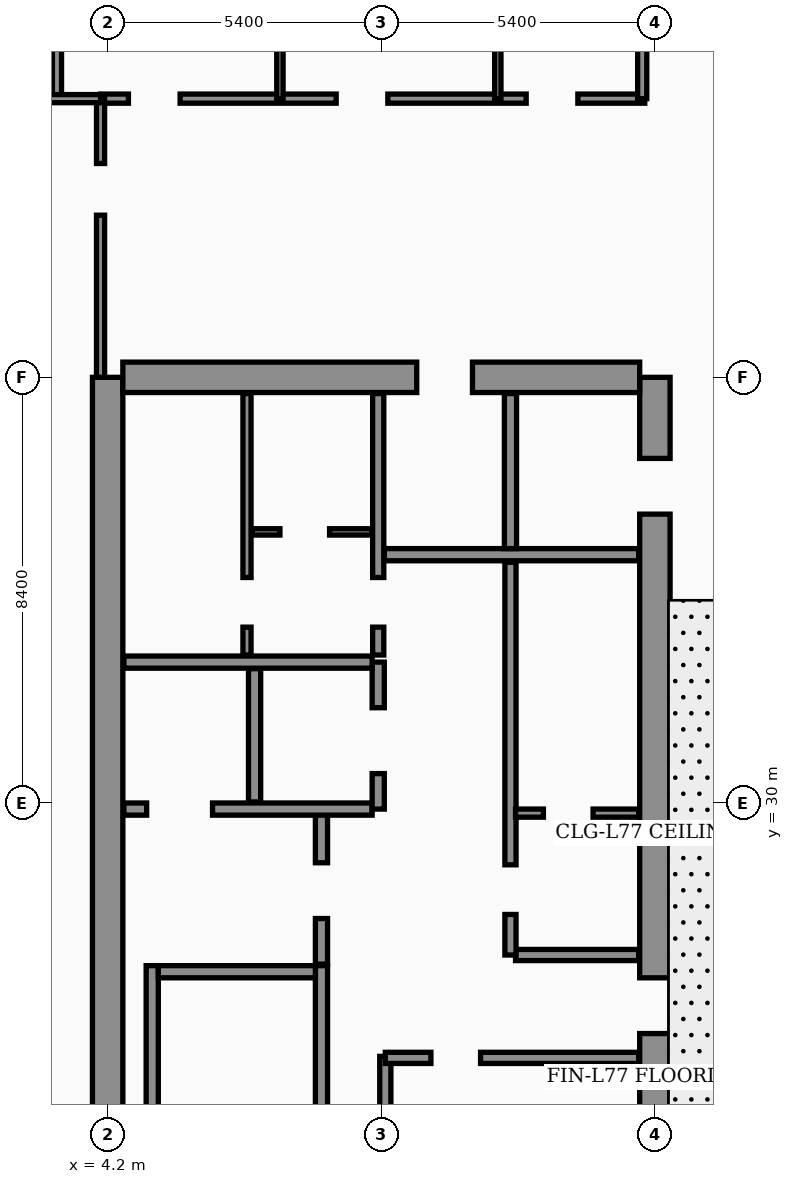
"""IFC4 building model, lengths in metres.
Left out: names, types, materials, properties, quantities, classifications, styles, units other than length and angle.
Written with IfcOpenShell. Run it as: python <this file> out.ifc"""

import sys

from ifc_helpers import new_model, si_unit, direction, frame, frame_2d, origin, place, context, subcontext, project, spatial, rectangle, extrude, element, fill, save


model = new_model("IFC4")
c1 = context("Model", 3, precision=1e-05, world=origin(), true_north=direction((0.0, 1.0)))
c2 = subcontext(c1, "Body", "Model", "MODEL_VIEW")
j1 = project(units=[si_unit("LENGTHUNIT", "METRE"), si_unit("PLANEANGLEUNIT", "RADIAN")], contexts=[c1])
p1 = place(None, origin())
s1 = spatial("IfcSite", under=j1, at=p1, CompositionType="ELEMENT")
p2 = place(p1, origin())
s2 = spatial("IfcBuilding", under=s1, at=p2, CompositionType="ELEMENT")
p3 = place(p2, frame((0.0, 0.0, 311.5)))
s3 = spatial("IfcBuildingStorey", under=s2, at=p3, CompositionType="ELEMENT", Elevation=311.5)
p4 = place(p3, frame((4.2, 16.8, 0.0), z_axis=(0.0, 0.0, 1.0), x_axis=(0.0, 1.0, 0.0)))
e1 = element("IfcWall", 1, at=p4, inside=s3, PredefinedType="SHEAR", context=c2, shape_type="SweptSolid", body=[
    extrude(rectangle(XDim=21.6, YDim=0.6, at=frame_2d((10.8, 0.0))), origin(), (0.0, 0.0, 1.0), 4.26),
])
p5 = place(p3, frame((15.0, 16.8, 0.0), z_axis=(0.0, 0.0, 1.0), x_axis=(0.0, 1.0, 0.0)))
e2 = element("IfcWall", 2, at=p5, inside=s3, PredefinedType="SHEAR", context=c2, shape_type="SweptSolid", body=[
    extrude(rectangle(XDim=21.6, YDim=0.6, at=frame_2d((10.8, 0.0))), origin(), (0.0, 0.0, 1.0), 4.26),
])
p6 = place(p5, frame((8.65, 0.0, 0.0)))
e3 = element("IfcOpeningElement", 3, at=p6, cuts=e2, PredefinedType="OPENING", context=c2, shape_type="SweptSolid", body=[
    extrude(rectangle(XDim=1.1, YDim=2.2, at=frame_2d((0.55, 1.1))), frame((0.0, 0.31, 0.0), z_axis=(0.0, -1.0, 0.0), x_axis=(1.0, 0.0, 0.0)), (0.0, 0.0, 1.0), 0.62),
])
p7 = place(p5, frame((18.9, 0.0, 0.0)))
e4 = element("IfcOpeningElement", 4, at=p7, cuts=e2, PredefinedType="OPENING", context=c2, shape_type="SweptSolid", body=[
    extrude(rectangle(XDim=1.1, YDim=2.2, at=frame_2d((0.55, 1.1))), frame((0.0, 0.31, 0.0), z_axis=(0.0, -1.0, 0.0), x_axis=(1.0, 0.0, 0.0)), (0.0, 0.0, 1.0), 0.62),
])
p8 = place(p3, frame((4.5, 38.4, 0.0), z_axis=(0.0, 0.0, 1.0), x_axis=(1.0, 0.0, 0.0)))
e5 = element("IfcWall", 5, at=p8, inside=s3, PredefinedType="SHEAR", context=c2, shape_type="SweptSolid", body=[
    extrude(rectangle(XDim=10.2, YDim=0.6, at=frame_2d((5.1, 0.0))), origin(), (0.0, 0.0, 1.0), 4.26),
])
p9 = place(p8, frame((5.8, 0.0, 0.0)))
e6 = element("IfcOpeningElement", 6, at=p9, cuts=e5, PredefinedType="OPENING", context=c2, shape_type="SweptSolid", body=[
    extrude(rectangle(XDim=1.1, YDim=2.2, at=frame_2d((0.55, 1.1))), frame((0.0, 0.31, 0.0), z_axis=(0.0, -1.0, 0.0), x_axis=(1.0, 0.0, 0.0)), (0.0, 0.0, 1.0), 0.62),
])
p10 = place(p3, frame((5.08, 17.1, 0.0), z_axis=(0.0, 0.0, 1.0), x_axis=(0.0, 1.0, 0.0)))
e7 = element("IfcWall", 7, at=p10, inside=s3, PredefinedType="SOLIDWALL", context=c2, shape_type="SweptSolid", body=[
    extrude(rectangle(XDim=9.69, YDim=0.24, at=frame_2d((4.845, 0.0))), origin(), (0.0, 0.0, 1.0), 4.26),
])
p11 = place(p3, frame((8.42, 17.1, 0.0), z_axis=(0.0, 0.0, 1.0), x_axis=(0.0, 1.0, 0.0)))
e8 = element("IfcWall", 8, at=p11, inside=s3, PredefinedType="SOLIDWALL", context=c2, shape_type="SweptSolid", body=[
    extrude(rectangle(XDim=9.69, YDim=0.24, at=frame_2d((4.845, 0.0))), origin(), (0.0, 0.0, 1.0), 4.26),
])
p12 = place(p11, frame((0.35, 0.0, 0.0)))
e9 = element("IfcOpeningElement", 9, at=p12, cuts=e8, PredefinedType="OPENING", context=c2, shape_type="SweptSolid", body=[
    extrude(rectangle(XDim=1.15, YDim=2.2, at=frame_2d((0.575, 1.1))), frame((0.0, 0.13, 0.0), z_axis=(0.0, -1.0, 0.0), x_axis=(1.0, 0.0, 0.0)), (0.0, 0.0, 1.0), 0.26),
])
p13 = place(p3, frame((5.2, 26.67, 0.0), z_axis=(0.0, 0.0, 1.0), x_axis=(1.0, 0.0, 0.0)))
e10 = element("IfcWall", 10, at=p13, inside=s3, PredefinedType="SOLIDWALL", context=c2, shape_type="SweptSolid", body=[
    extrude(rectangle(XDim=3.1, YDim=0.24, at=frame_2d((1.55, 0.0))), origin(), (0.0, 0.0, 1.0), 4.26),
])
p14 = place(p3, frame((8.42, 26.82, 0.0), z_axis=(0.0, 0.0, 1.0), x_axis=(0.0, 1.0, 0.0)))
e11 = element("IfcWall", 11, at=p14, inside=s3, PredefinedType="SOLIDWALL", context=c2, shape_type="SweptSolid", body=[
    extrude(rectangle(XDim=3.0, YDim=0.24, at=frame_2d((1.5, 0.0))), origin(), (0.0, 0.0, 1.0), 4.26),
])
p15 = place(p14, frame((0.9, 0.0, 0.0)))
e12 = element("IfcOpeningElement", 12, at=p15, cuts=e11, PredefinedType="OPENING", context=c2, shape_type="SweptSolid", body=[
    extrude(rectangle(XDim=1.1, YDim=2.2, at=frame_2d((0.55, 1.1))), frame((0.0, 0.13, 0.0), z_axis=(0.0, -1.0, 0.0), x_axis=(1.0, 0.0, 0.0)), (0.0, 0.0, 1.0), 0.26),
])
p16 = place(p3, frame((4.52, 29.88, 0.0), z_axis=(0.0, 0.0, 1.0), x_axis=(1.0, 0.0, 0.0)))
e13 = element("IfcWall", 13, at=p16, inside=s3, PredefinedType="SOLIDWALL", context=c2, shape_type="SweptSolid", body=[
    extrude(rectangle(XDim=4.9, YDim=0.24, at=frame_2d((2.45, 0.0))), origin(), (0.0, 0.0, 1.0), 4.26),
])
p17 = place(p16, frame((0.45, 0.0, 0.0)))
e14 = element("IfcOpeningElement", 14, at=p17, cuts=e13, PredefinedType="OPENING", context=c2, shape_type="SweptSolid", body=[
    extrude(rectangle(XDim=1.3, YDim=2.35, at=frame_2d((0.65, 1.175))), frame((0.0, 0.13, 0.0), z_axis=(0.0, -1.0, 0.0), x_axis=(1.0, 0.0, 0.0)), (0.0, 0.0, 1.0), 0.26),
])
p18 = place(p3, frame((7.1, 30.02, 0.0), z_axis=(0.0, 0.0, 1.0), x_axis=(0.0, 1.0, 0.0)))
e15 = element("IfcWall", 15, at=p18, inside=s3, PredefinedType="SOLIDWALL", context=c2, shape_type="SweptSolid", body=[
    extrude(rectangle(XDim=2.63, YDim=0.24, at=frame_2d((1.315, 0.0))), origin(), (0.0, 0.0, 1.0), 4.26),
])
p19 = place(p3, frame((9.54, 29.88, 0.0), z_axis=(0.0, 0.0, 1.0), x_axis=(0.0, 1.0, 0.0)))
e16 = element("IfcWall", 16, at=p19, inside=s3, PredefinedType="SOLIDWALL", context=c2, shape_type="SweptSolid", body=[
    extrude(rectangle(XDim=2.9, YDim=0.24, at=frame_2d((1.45, 0.0))), origin(), (0.0, 0.0, 1.0), 4.26),
])
p20 = place(p19, frame((0.7, 0.0, 0.0)))
e17 = element("IfcOpeningElement", 17, at=p20, cuts=e16, PredefinedType="OPENING", context=c2, shape_type="SweptSolid", body=[
    extrude(rectangle(XDim=1.3, YDim=2.35, at=frame_2d((0.65, 1.175))), frame((0.0, 0.13, 0.0), z_axis=(0.0, -1.0, 0.0), x_axis=(1.0, 0.0, 0.0)), (0.0, 0.0, 1.0), 0.26),
])
p21 = place(p3, frame((4.52, 32.78, 0.0), z_axis=(0.0, 0.0, 1.0), x_axis=(1.0, 0.0, 0.0)))
e18 = element("IfcWall", 18, at=p21, inside=s3, PredefinedType="SOLIDWALL", context=c2, shape_type="SweptSolid", body=[
    extrude(rectangle(XDim=4.9, YDim=0.24, at=frame_2d((2.45, 0.0))), origin(), (0.0, 0.0, 1.0), 3.89),
])
p22 = place(p3, frame((9.68, 17.12, 0.0), z_axis=(0.0, 0.0, 1.0), x_axis=(0.0, 1.0, 0.0)))
e19 = element("IfcWall", 19, at=p22, inside=s3, PredefinedType="SOLIDWALL", context=c2, shape_type="SweptSolid", body=[
    extrude(rectangle(XDim=7.88, YDim=0.22, at=frame_2d((3.94, 0.0))), origin(), (0.0, 0.0, 1.0), 4.26),
])
p23 = place(p3, frame((6.95, 32.92, 0.0), z_axis=(0.0, 0.0, 1.0), x_axis=(0.0, 1.0, 0.0)))
e20 = element("IfcWall", 20, at=p23, inside=s3, PredefinedType="PARTITIONING", context=c2, shape_type="SweptSolid", body=[
    extrude(rectangle(XDim=5.16, YDim=0.16, at=frame_2d((2.58, 0.0))), origin(), (0.0, 0.0, 1.0), 4.26),
])
p24 = place(p23, frame((0.55, 0.0, 0.0)))
e21 = element("IfcOpeningElement", 21, at=p24, cuts=e20, PredefinedType="OPENING", context=c2, shape_type="SweptSolid", body=[
    extrude(rectangle(XDim=0.98, YDim=2.15, at=frame_2d((0.49, 1.075))), frame((0.0, 0.09, 0.0), z_axis=(0.0, -1.0, 0.0), x_axis=(1.0, 0.0, 0.0)), (0.0, 0.0, 1.0), 0.18),
])
p25 = place(p3, frame((7.05, 35.35, 0.0), z_axis=(0.0, 0.0, 1.0), x_axis=(1.0, 0.0, 0.0)))
e22 = element("IfcWall", 22, at=p25, inside=s3, PredefinedType="PARTITIONING", context=c2, shape_type="SweptSolid", body=[
    extrude(rectangle(XDim=2.37, YDim=0.125, at=frame_2d((1.185, 0.0))), origin(), (0.0, 0.0, 1.0), 4.26),
])
p26 = place(p25, frame((0.55, 0.0, 0.0)))
e23 = element("IfcOpeningElement", 23, at=p26, cuts=e22, PredefinedType="OPENING", context=c2, shape_type="SweptSolid", body=[
    extrude(rectangle(XDim=0.98, YDim=2.15, at=frame_2d((0.49, 1.075))), frame((0.0, 0.073, 0.0), z_axis=(0.0, -1.0, 0.0), x_axis=(1.0, 0.0, 0.0)), (0.0, 0.0, 1.0), 0.145),
])
p27 = place(p3, frame((9.54, 32.92, 0.0), z_axis=(0.0, 0.0, 1.0), x_axis=(0.0, 1.0, 0.0)))
e24 = element("IfcWall", 24, at=p27, inside=s3, PredefinedType="SOLIDWALL", context=c2, shape_type="SweptSolid", body=[
    extrude(rectangle(XDim=5.16, YDim=0.22, at=frame_2d((2.58, 0.0))), origin(), (0.0, 0.0, 1.0), 4.26),
])
p28 = place(p27, frame((0.55, 0.0, 0.0)))
e25 = element("IfcOpeningElement", 25, at=p28, cuts=e24, PredefinedType="OPENING", context=c2, shape_type="SweptSolid", body=[
    extrude(rectangle(XDim=0.98, YDim=2.15, at=frame_2d((0.49, 1.075))), frame((0.0, 0.12, 0.0), z_axis=(0.0, -1.0, 0.0), x_axis=(1.0, 0.0, 0.0)), (0.0, 0.0, 1.0), 0.24),
])
p29 = place(p3, frame((9.68, 24.97, 0.0), z_axis=(0.0, 0.0, 1.0), x_axis=(1.0, 0.0, 0.0)))
e26 = element("IfcWall", 26, at=p29, inside=s3, PredefinedType="SOLIDWALL", context=c2, shape_type="SweptSolid", body=[
    extrude(rectangle(XDim=5.0, YDim=0.22, at=frame_2d((2.5, 0.0))), origin(), (0.0, 0.0, 1.0), 3.69),
])
p30 = place(p29, frame((0.9, 0.0, 0.0)))
e27 = element("IfcOpeningElement", 27, at=p30, cuts=e26, PredefinedType="OPENING", context=c2, shape_type="SweptSolid", body=[
    extrude(rectangle(XDim=0.98, YDim=2.15, at=frame_2d((0.49, 1.075))), frame((0.0, 0.12, 0.0), z_axis=(0.0, -1.0, 0.0), x_axis=(1.0, 0.0, 0.0)), (0.0, 0.0, 1.0), 0.24),
])
p31 = place(p3, frame((12.25, 27.0, 0.0), z_axis=(0.0, 0.0, 1.0), x_axis=(1.0, 0.0, 0.0)))
e28 = element("IfcWall", 28, at=p31, inside=s3, PredefinedType="SOLIDWALL", context=c2, shape_type="SweptSolid", body=[
    extrude(rectangle(XDim=2.43, YDim=0.22, at=frame_2d((1.215, 0.0))), origin(), (0.0, 0.0, 1.0), 4.26),
])
p32 = place(p3, frame((12.15, 27.0, 0.0), z_axis=(0.0, 0.0, 1.0), x_axis=(0.0, 1.0, 0.0)))
e29 = element("IfcWall", 29, at=p32, inside=s3, PredefinedType="SOLIDWALL", context=c2, shape_type="SweptSolid", body=[
    extrude(rectangle(XDim=7.75, YDim=0.22, at=frame_2d((3.875, 0.0))), origin(), (0.0, 0.0, 1.0), 4.26),
])
p33 = place(p32, frame((0.8, 0.0, 0.0)))
e30 = element("IfcOpeningElement", 30, at=p33, cuts=e29, PredefinedType="OPENING", context=c2, shape_type="SweptSolid", body=[
    extrude(rectangle(XDim=0.98, YDim=2.15, at=frame_2d((0.49, 1.075))), frame((0.0, 0.12, 0.0), z_axis=(0.0, -1.0, 0.0), x_axis=(1.0, 0.0, 0.0)), (0.0, 0.0, 1.0), 0.24),
])
p34 = place(p3, frame((12.25, 29.8, 0.0), z_axis=(0.0, 0.0, 1.0), x_axis=(1.0, 0.0, 0.0)))
e31 = element("IfcWall", 31, at=p34, inside=s3, PredefinedType="PARTITIONING", context=c2, shape_type="SweptSolid", body=[
    extrude(rectangle(XDim=2.43, YDim=0.16, at=frame_2d((1.215, 0.0))), origin(), (0.0, 0.0, 1.0), 4.26),
])
p35 = place(p34, frame((0.55, 0.0, 0.0)))
e32 = element("IfcOpeningElement", 32, at=p35, cuts=e31, PredefinedType="OPENING", context=c2, shape_type="SweptSolid", body=[
    extrude(rectangle(XDim=0.98, YDim=2.15, at=frame_2d((0.49, 1.075))), frame((0.0, 0.09, 0.0), z_axis=(0.0, -1.0, 0.0), x_axis=(1.0, 0.0, 0.0)), (0.0, 0.0, 1.0), 0.18),
])
p36 = place(p3, frame((9.66, 34.9, 0.0), z_axis=(0.0, 0.0, 1.0), x_axis=(1.0, 0.0, 0.0)))
e33 = element("IfcWall", 33, at=p36, inside=s3, PredefinedType="SOLIDWALL", context=c2, shape_type="SweptSolid", body=[
    extrude(rectangle(XDim=5.02, YDim=0.24, at=frame_2d((2.51, 0.0))), origin(), (0.0, 0.0, 1.0), 4.26),
])
p37 = place(p3, frame((12.15, 35.02, 0.0), z_axis=(0.0, 0.0, 1.0), x_axis=(0.0, 1.0, 0.0)))
e34 = element("IfcWall", 34, at=p37, inside=s3, PredefinedType="SOLIDWALL", context=c2, shape_type="SweptSolid", body=[
    extrude(rectangle(XDim=3.06, YDim=0.24, at=frame_2d((1.53, 0.0))), origin(), (0.0, 0.0, 1.0), 4.26),
])
p38 = place(p3, frame((3.2, 43.9, 0.0), z_axis=(0.0, 0.0, 1.0), x_axis=(0.0, 1.0, 0.0)))
e35 = element("IfcWall", 35, at=p38, inside=s3, PredefinedType="PARTITIONING", context=c2, shape_type="SweptSolid", body=[
    extrude(rectangle(XDim=3.9, YDim=0.18, at=frame_2d((1.95, 0.0))), origin(), (0.0, 0.0, 1.0), 4.26),
])
p39 = place(p3, frame((4.06, 43.9, 0.0), z_axis=(0.0, 0.0, 1.0), x_axis=(1.0, 0.0, 0.0)))
e36 = element("IfcWall", 36, at=p39, inside=s3, PredefinedType="PARTITIONING", context=c2, shape_type="SweptSolid", body=[
    extrude(rectangle(XDim=10.74, YDim=0.18, at=frame_2d((5.37, 0.0))), origin(), (0.0, 0.0, 1.0), 3.69),
])
p40 = place(p39, frame((0.55, 0.0, 0.0)))
e37 = element("IfcOpeningElement", 37, at=p40, cuts=e36, PredefinedType="OPENING", context=c2, shape_type="SweptSolid", body=[
    extrude(rectangle(XDim=1.02, YDim=2.2, at=frame_2d((0.51, 1.1))), frame((0.0, 0.1, 0.0), z_axis=(0.0, -1.0, 0.0), x_axis=(1.0, 0.0, 0.0)), (0.0, 0.0, 1.0), 0.2),
])
p41 = place(p39, frame((4.65, 0.0, 0.0)))
e38 = element("IfcOpeningElement", 38, at=p41, cuts=e36, PredefinedType="OPENING", context=c2, shape_type="SweptSolid", body=[
    extrude(rectangle(XDim=1.02, YDim=2.2, at=frame_2d((0.51, 1.1))), frame((0.0, 0.1, 0.0), z_axis=(0.0, -1.0, 0.0), x_axis=(1.0, 0.0, 0.0)), (0.0, 0.0, 1.0), 0.2),
])
p42 = place(p39, frame((8.4, 0.0, 0.0)))
e39 = element("IfcOpeningElement", 39, at=p42, cuts=e36, PredefinedType="OPENING", context=c2, shape_type="SweptSolid", body=[
    extrude(rectangle(XDim=1.02, YDim=2.2, at=frame_2d((0.51, 1.1))), frame((0.0, 0.1, 0.0), z_axis=(0.0, -1.0, 0.0), x_axis=(1.0, 0.0, 0.0)), (0.0, 0.0, 1.0), 0.2),
])
p43 = place(p3, frame((4.06, 38.4, 0.0), z_axis=(0.0, 0.0, 1.0), x_axis=(0.0, 1.0, 0.0)))
e40 = element("IfcWall", 40, at=p43, inside=s3, PredefinedType="PARTITIONING", context=c2, shape_type="SweptSolid", body=[
    extrude(rectangle(XDim=5.5, YDim=0.16, at=frame_2d((2.75, 0.0))), origin(), (0.0, 0.0, 1.0), 3.69),
])
p44 = place(p43, frame((3.2, 0.0, 0.0)))
e41 = element("IfcOpeningElement", 41, at=p44, cuts=e40, PredefinedType="OPENING", context=c2, shape_type="SweptSolid", body=[
    extrude(rectangle(XDim=1.02, YDim=2.2, at=frame_2d((0.51, 1.1))), frame((0.0, 0.09, 0.0), z_axis=(0.0, -1.0, 0.0), x_axis=(1.0, 0.0, 0.0)), (0.0, 0.0, 1.0), 0.18),
])
p45 = place(p3, frame((0.08, 43.9, 0.0), z_axis=(0.0, 0.0, 1.0), x_axis=(1.0, 0.0, 0.0)))
e42 = element("IfcWall", 42, at=p45, inside=s3, PredefinedType="PARTITIONING", context=c2, shape_type="SweptSolid", body=[
    extrude(rectangle(XDim=3.98, YDim=0.16, at=frame_2d((1.99, 0.0))), origin(), (0.0, 0.0, 1.0), 3.69),
])
p46 = place(p3, frame((14.75, 43.9, 0.0), z_axis=(0.0, 0.0, 1.0), x_axis=(0.0, 1.0, 0.0)))
e43 = element("IfcWall", 43, at=p46, inside=s3, PredefinedType="PARTITIONING", context=c2, shape_type="SweptSolid", body=[
    extrude(rectangle(XDim=3.82, YDim=0.18, at=frame_2d((1.91, 0.0))), origin(), (0.0, 0.0, 1.0), 3.79),
])
for number, where, z_axis, x_axis in (
    (44, (7.6, 43.9, 0.0), (0.0, 0.0, 1.0), (0.0, 1.0, 0.0)),
    (45, (11.9, 43.9, 0.0), (0.0, 0.0, 1.0), (0.0, 1.0, 0.0)),
):
    element("IfcWall", number, at=place(p3, frame(where, z_axis=z_axis, x_axis=x_axis)), inside=s3, PredefinedType="PARTITIONING", context=c2, shape_type="SweptSolid", body=[
        extrude(rectangle(XDim=7.04, YDim=0.125, at=frame_2d((3.52, 0.0))), origin(), (0.0, 0.0, 1.0), 3.79),
    ])
p47 = place(p15, origin())
e46 = element("IfcDoor", 46, at=p47, inside=s3, OperationType="SINGLE_SWING_RIGHT", PredefinedType="DOOR", context=c2, shape_type="SweptSolid", body=[
    extrude(rectangle(XDim=1.1, YDim=2.2, at=frame_2d((0.55, 1.1))), frame((0.0, 0.025, 0.0), z_axis=(0.0, -1.0, 0.0), x_axis=(1.0, 0.0, 0.0)), (0.0, 0.0, 1.0), 0.05),
])
fill(e12, e46)
p48 = place(p17, origin())
e47 = element("IfcDoor", 47, at=p48, inside=s3, OperationType="DOUBLE_DOOR_SLIDING", PredefinedType="DOOR", context=c2, shape_type="SweptSolid", body=[
    extrude(rectangle(XDim=1.3, YDim=2.35, at=frame_2d((0.65, 1.175))), frame((0.0, 0.025, 0.0), z_axis=(0.0, -1.0, 0.0), x_axis=(1.0, 0.0, 0.0)), (0.0, 0.0, 1.0), 0.05),
])
fill(e14, e47)
p49 = place(p20, origin())
e48 = element("IfcDoor", 48, at=p49, inside=s3, OperationType="DOUBLE_DOOR_SLIDING", PredefinedType="DOOR", context=c2, shape_type="SweptSolid", body=[
    extrude(rectangle(XDim=1.3, YDim=2.35, at=frame_2d((0.65, 1.175))), frame((0.0, 0.025, 0.0), z_axis=(0.0, -1.0, 0.0), x_axis=(1.0, 0.0, 0.0)), (0.0, 0.0, 1.0), 0.05),
])
fill(e17, e48)
p50 = place(p24, origin())
e49 = element("IfcDoor", 49, at=p50, inside=s3, OperationType="SINGLE_SWING_LEFT", PredefinedType="DOOR", context=c2, shape_type="SweptSolid", body=[
    extrude(rectangle(XDim=0.98, YDim=2.15, at=frame_2d((0.49, 1.075))), frame((0.0, 0.025, 0.0), z_axis=(0.0, -1.0, 0.0), x_axis=(1.0, 0.0, 0.0)), (0.0, 0.0, 1.0), 0.05),
])
fill(e21, e49)
p51 = place(p26, origin())
e50 = element("IfcDoor", 50, at=p51, inside=s3, OperationType="SINGLE_SWING_RIGHT", PredefinedType="DOOR", context=c2, shape_type="SweptSolid", body=[
    extrude(rectangle(XDim=0.98, YDim=2.15, at=frame_2d((0.49, 1.075))), frame((0.0, 0.025, 0.0), z_axis=(0.0, -1.0, 0.0), x_axis=(1.0, 0.0, 0.0)), (0.0, 0.0, 1.0), 0.05),
])
fill(e23, e50)
p52 = place(p28, origin())
e51 = element("IfcDoor", 51, at=p52, inside=s3, OperationType="SINGLE_SWING_LEFT", PredefinedType="DOOR", context=c2, shape_type="SweptSolid", body=[
    extrude(rectangle(XDim=0.98, YDim=2.15, at=frame_2d((0.49, 1.075))), frame((0.0, 0.025, 0.0), z_axis=(0.0, -1.0, 0.0), x_axis=(1.0, 0.0, 0.0)), (0.0, 0.0, 1.0), 0.05),
])
fill(e25, e51)
p53 = place(p30, origin())
e52 = element("IfcDoor", 52, at=p53, inside=s3, OperationType="SINGLE_SWING_RIGHT", PredefinedType="DOOR", context=c2, shape_type="SweptSolid", body=[
    extrude(rectangle(XDim=0.98, YDim=2.15, at=frame_2d((0.49, 1.075))), frame((0.0, 0.025, 0.0), z_axis=(0.0, -1.0, 0.0), x_axis=(1.0, 0.0, 0.0)), (0.0, 0.0, 1.0), 0.05),
])
fill(e27, e52)
p54 = place(p33, origin())
e53 = element("IfcDoor", 53, at=p54, inside=s3, OperationType="SINGLE_SWING_RIGHT", PredefinedType="DOOR", context=c2, shape_type="SweptSolid", body=[
    extrude(rectangle(XDim=0.98, YDim=2.15, at=frame_2d((0.49, 1.075))), frame((0.0, 0.025, 0.0), z_axis=(0.0, -1.0, 0.0), x_axis=(1.0, 0.0, 0.0)), (0.0, 0.0, 1.0), 0.05),
])
fill(e30, e53)
p55 = place(p35, origin())
e54 = element("IfcDoor", 54, at=p55, inside=s3, OperationType="SINGLE_SWING_LEFT", PredefinedType="DOOR", context=c2, shape_type="SweptSolid", body=[
    extrude(rectangle(XDim=0.98, YDim=2.15, at=frame_2d((0.49, 1.075))), frame((0.0, 0.025, 0.0), z_axis=(0.0, -1.0, 0.0), x_axis=(1.0, 0.0, 0.0)), (0.0, 0.0, 1.0), 0.05),
])
fill(e32, e54)
p56 = place(p40, origin())
e55 = element("IfcDoor", 55, at=p56, inside=s3, OperationType="SINGLE_SWING_LEFT", PredefinedType="DOOR", context=c2, shape_type="SweptSolid", body=[
    extrude(rectangle(XDim=1.02, YDim=2.2, at=frame_2d((0.51, 1.1))), frame((0.0, 0.025, 0.0), z_axis=(0.0, -1.0, 0.0), x_axis=(1.0, 0.0, 0.0)), (0.0, 0.0, 1.0), 0.05),
])
fill(e37, e55)
p57 = place(p41, origin())
e56 = element("IfcDoor", 56, at=p57, inside=s3, OperationType="SINGLE_SWING_RIGHT", PredefinedType="DOOR", context=c2, shape_type="SweptSolid", body=[
    extrude(rectangle(XDim=1.02, YDim=2.2, at=frame_2d((0.51, 1.1))), frame((0.0, 0.025, 0.0), z_axis=(0.0, -1.0, 0.0), x_axis=(1.0, 0.0, 0.0)), (0.0, 0.0, 1.0), 0.05),
])
fill(e38, e56)
p58 = place(p42, origin())
e57 = element("IfcDoor", 57, at=p58, inside=s3, OperationType="SINGLE_SWING_LEFT", PredefinedType="DOOR", context=c2, shape_type="SweptSolid", body=[
    extrude(rectangle(XDim=1.02, YDim=2.2, at=frame_2d((0.51, 1.1))), frame((0.0, 0.025, 0.0), z_axis=(0.0, -1.0, 0.0), x_axis=(1.0, 0.0, 0.0)), (0.0, 0.0, 1.0), 0.05),
])
fill(e39, e57)
p59 = place(p44, origin())
e58 = element("IfcDoor", 58, at=p59, inside=s3, OperationType="SINGLE_SWING_LEFT", PredefinedType="DOOR", context=c2, shape_type="SweptSolid", body=[
    extrude(rectangle(XDim=1.02, YDim=2.2, at=frame_2d((0.51, 1.1))), frame((0.0, 0.025, 0.0), z_axis=(0.0, -1.0, 0.0), x_axis=(1.0, 0.0, 0.0)), (0.0, 0.0, 1.0), 0.05),
])
fill(e41, e58)
p60 = place(p6, origin())
e59 = element("IfcDoor", 59, at=p60, inside=s3, OperationType="SINGLE_SWING_RIGHT", PredefinedType="DOOR", context=c2, shape_type="SweptSolid", body=[
    extrude(rectangle(XDim=1.1, YDim=2.2, at=frame_2d((0.55, 1.1))), frame((0.0, 0.025, 0.0), z_axis=(0.0, -1.0, 0.0), x_axis=(1.0, 0.0, 0.0)), (0.0, 0.0, 1.0), 0.05),
])
fill(e3, e59)
p61 = place(p7, origin())
e60 = element("IfcDoor", 60, at=p61, inside=s3, OperationType="DOUBLE_DOOR_SLIDING", PredefinedType="DOOR", context=c2, shape_type="SweptSolid", body=[
    extrude(rectangle(XDim=1.1, YDim=2.2, at=frame_2d((0.55, 1.1))), frame((0.0, 0.025, 0.0), z_axis=(0.0, -1.0, 0.0), x_axis=(1.0, 0.0, 0.0)), (0.0, 0.0, 1.0), 0.05),
])
fill(e4, e60)
p62 = place(p9, origin())
e61 = element("IfcDoor", 61, at=p62, inside=s3, OperationType="DOUBLE_DOOR_SLIDING", PredefinedType="DOOR", context=c2, shape_type="SweptSolid", body=[
    extrude(rectangle(XDim=1.1, YDim=2.2, at=frame_2d((0.55, 1.1))), frame((0.0, 0.025, 0.0), z_axis=(0.0, -1.0, 0.0), x_axis=(1.0, 0.0, 0.0)), (0.0, 0.0, 1.0), 0.05),
])
fill(e6, e61)
save(model, sys.argv[1])
